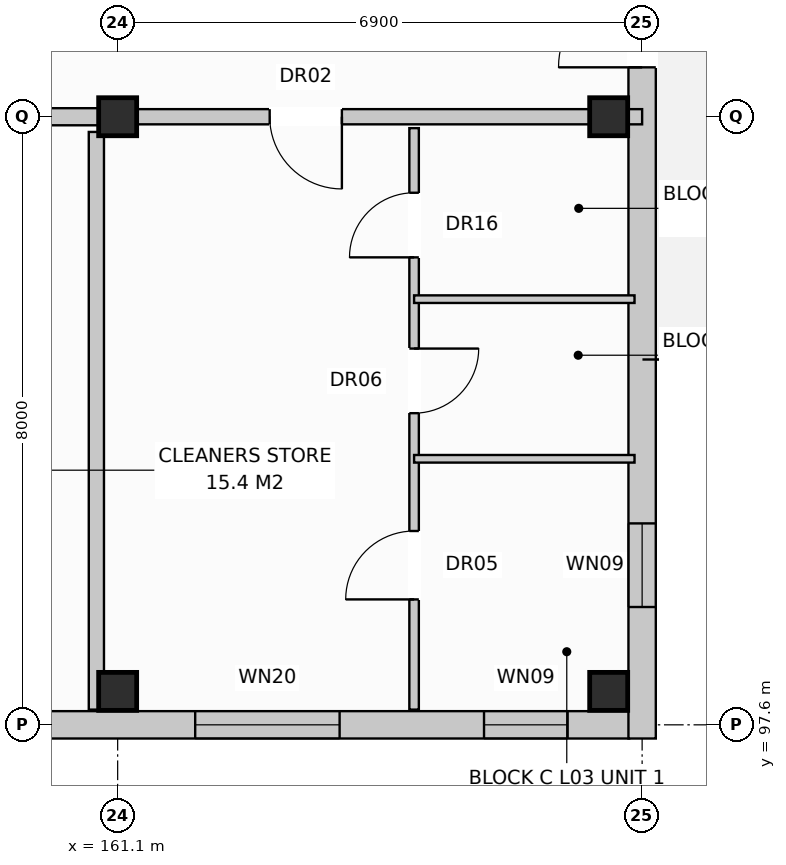
"""IFC4 building model, lengths in metres.
Left out: names, types, materials, properties, quantities, classifications, styles, units other than length and angle.
Written with IfcOpenShell. Run it as: python <this file> out.ifc"""

import sys

from ifc_helpers import new_model, si_unit, direction, frame, frame_2d, origin, origin_with_axes, origin_2d, place, context, subcontext, project, spatial, rectangle, extrude, element, fill, save


model = new_model("IFC4")
c1 = context("Model", 3, precision=1e-05, world=origin(), true_north=direction((0.0, 1.0)))
c2 = subcontext(c1, "Body", "Model", "MODEL_VIEW")
j1 = project(units=[si_unit("LENGTHUNIT", "METRE"), si_unit("PLANEANGLEUNIT", "RADIAN")], contexts=[c1])
p1 = place(None, origin())
s1 = spatial("IfcSite", under=j1, at=p1, CompositionType="ELEMENT")
p2 = place(p1, origin())
s2 = spatial("IfcBuilding", under=s1, at=p2, CompositionType="ELEMENT")
p3 = place(p2, frame((0.0, 0.0, 11.2)))
s3 = spatial("IfcBuildingStorey", under=s2, at=p3, CompositionType="ELEMENT", Elevation=11.2)
for number, where, z_axis, x_axis in (
    (1, (161.1, 98.04, 0.0), (0.0, 0.0, 1.0), (1.0, 0.0, 0.0)),
    (2, (161.1, 105.6, 0.0), (0.0, 0.0, 1.0), (1.0, 0.0, 0.0)),
    (3, (167.56, 98.04, 0.0), (0.0, 0.0, 1.0), (1.0, 0.0, 0.0)),
    (4, (167.56, 105.6, 0.0), (0.0, 0.0, 1.0), (1.0, 0.0, 0.0)),
):
    element("IfcColumn", number, at=place(p3, frame(where, z_axis=z_axis, x_axis=x_axis)), inside=s3, PredefinedType="COLUMN", context=c2, shape_type="SweptSolid", body=[
        extrude(rectangle(XDim=0.5, YDim=0.5, at=origin_2d()), origin(), (0.0, 0.0, 1.0), 3.2),
    ])
p4 = place(p3, frame((151.05, 97.6, 0.0), z_axis=(0.0, 0.0, 1.0), x_axis=(1.0, 0.0, 0.0)))
e5 = element("IfcWall", 5, at=p4, inside=s3, PredefinedType="STANDARD", context=c2, shape_type="SweptSolid", body=[
    extrude(rectangle(XDim=16.78, YDim=0.36, at=frame_2d((8.39, 0.0))), origin(), (0.0, 0.0, 1.0), 2.94),
])
p5 = place(p4, frame((11.07, 0.0, 0.8)))
e6 = element("IfcOpeningElement", 6, at=p5, cuts=e5, PredefinedType="OPENING", context=c2, shape_type="SweptSolid", body=[
    extrude(rectangle(XDim=1.9, YDim=1.85, at=frame_2d((0.95, 0.925))), frame((0.0, 0.192, 0.0), z_axis=(0.0, -1.0, 0.0), x_axis=(1.0, 0.0, 0.0)), (0.0, 0.0, 1.0), 0.384),
])
p6 = place(p4, frame((14.87, 0.0, 0.72)))
e7 = element("IfcOpeningElement", 7, at=p6, cuts=e5, PredefinedType="OPENING", context=c2, shape_type="SweptSolid", body=[
    extrude(rectangle(XDim=1.1, YDim=1.5, at=frame_2d((0.55, 0.75))), frame((0.0, 0.192, 0.0), z_axis=(0.0, -1.0, 0.0), x_axis=(1.0, 0.0, 0.0)), (0.0, 0.0, 1.0), 0.384),
])
p7 = place(p3, frame((168.0, 97.42, 0.0), z_axis=(0.0, 0.0, 1.0), x_axis=(0.0, 1.0, 0.0)))
e8 = element("IfcWall", 8, at=p7, inside=s3, PredefinedType="STANDARD", context=c2, shape_type="SweptSolid", body=[
    extrude(rectangle(XDim=18.76, YDim=0.36, at=frame_2d((9.38, 0.0))), origin(), (0.0, 0.0, 1.0), 2.94),
])
p8 = place(p7, frame((8.83, 0.0, 0.0)))
e9 = element("IfcOpeningElement", 9, at=p8, cuts=e8, PredefinedType="OPENING", context=c2, shape_type="SweptSolid", body=[
    extrude(rectangle(XDim=1.1, YDim=2.1, at=frame_2d((0.55, 1.05))), frame((0.0, 0.192, 0.0), z_axis=(0.0, -1.0, 0.0), x_axis=(1.0, 0.0, 0.0)), (0.0, 0.0, 1.0), 0.384),
])
p9 = place(p7, frame((1.73, 0.0, 0.72)))
e10 = element("IfcOpeningElement", 10, at=p9, cuts=e8, PredefinedType="OPENING", context=c2, shape_type="SweptSolid", body=[
    extrude(rectangle(XDim=1.1, YDim=1.5, at=frame_2d((0.55, 0.75))), frame((0.0, 0.192, 0.0), z_axis=(0.0, -1.0, 0.0), x_axis=(1.0, 0.0, 0.0)), (0.0, 0.0, 1.0), 0.384),
])
p10 = place(p7, frame((15.93, 0.0, 0.72)))
e11 = element("IfcOpeningElement", 11, at=p10, cuts=e8, PredefinedType="OPENING", context=c2, shape_type="SweptSolid", body=[
    extrude(rectangle(XDim=1.1, YDim=1.5, at=frame_2d((0.55, 0.75))), frame((0.0, 0.192, 0.0), z_axis=(0.0, -1.0, 0.0), x_axis=(1.0, 0.0, 0.0)), (0.0, 0.0, 1.0), 0.384),
])
p11 = place(p3, frame((160.82, 97.8, 0.0), z_axis=(0.0, 0.0, 1.0), x_axis=(0.0, 1.0, 0.0)))
e12 = element("IfcWall", 12, at=p11, inside=s3, PredefinedType="PARTITIONING", context=c2, shape_type="SweptSolid", body=[
    extrude(rectangle(XDim=7.6, YDim=0.2, at=frame_2d((3.8, 0.0))), origin(), (0.0, 0.0, 1.0), 2.38),
])
p12 = place(p3, frame((151.2, 105.6, 0.0), z_axis=(0.0, 0.0, 1.0), x_axis=(1.0, 0.0, 0.0)))
e13 = element("IfcWall", 13, at=p12, inside=s3, PredefinedType="PARTITIONING", context=c2, shape_type="SweptSolid", body=[
    extrude(rectangle(XDim=9.9, YDim=0.225, at=frame_2d((4.95, 0.0))), origin(), (0.0, 0.0, 1.0), 2.38),
])
p13 = place(p12, frame((0.475, 0.0, 0.0)))
e14 = element("IfcOpeningElement", 14, at=p13, cuts=e13, PredefinedType="OPENING", context=c2, shape_type="SweptSolid", body=[
    extrude(rectangle(XDim=1.1, YDim=2.15, at=frame_2d((0.55, 1.075))), frame((0.0, 0.125, 0.0), z_axis=(0.0, -1.0, 0.0), x_axis=(1.0, 0.0, 0.0)), (0.0, 0.0, 1.0), 0.249),
])
p14 = place(p12, frame((5.75, 0.0, 0.0)))
e15 = element("IfcOpeningElement", 15, at=p14, cuts=e13, PredefinedType="OPENING", context=c2, shape_type="SweptSolid", body=[
    extrude(rectangle(XDim=0.9, YDim=2.1, at=frame_2d((0.45, 1.05))), frame((0.0, 0.125, 0.0), z_axis=(0.0, -1.0, 0.0), x_axis=(1.0, 0.0, 0.0)), (0.0, 0.0, 1.0), 0.249),
])
p15 = place(p12, frame((7.8, 0.0, 0.0)))
e16 = element("IfcOpeningElement", 16, at=p15, cuts=e13, PredefinedType="OPENING", context=c2, shape_type="SweptSolid", body=[
    extrude(rectangle(XDim=0.95, YDim=2.15, at=frame_2d((0.475, 1.075))), frame((0.0, 0.125, 0.0), z_axis=(0.0, -1.0, 0.0), x_axis=(1.0, 0.0, 0.0)), (0.0, 0.0, 1.0), 0.249),
])
p16 = place(p3, frame((161.1, 105.6, 0.0), z_axis=(0.0, 0.0, 1.0), x_axis=(1.0, 0.0, 0.0)))
e17 = element("IfcWall", 17, at=p16, inside=s3, PredefinedType="PARTITIONING", context=c2, shape_type="SweptSolid", body=[
    extrude(rectangle(XDim=6.9, YDim=0.2, at=frame_2d((3.45, 0.0))), origin(), (0.0, 0.0, 1.0), 2.38),
])
p17 = place(p16, frame((2.0, 0.0, 0.0)))
e18 = element("IfcOpeningElement", 18, at=p17, cuts=e17, PredefinedType="OPENING", context=c2, shape_type="SweptSolid", body=[
    extrude(rectangle(XDim=0.95, YDim=2.15, at=frame_2d((0.475, 1.075))), frame((0.0, 0.112, 0.0), z_axis=(0.0, -1.0, 0.0), x_axis=(1.0, 0.0, 0.0)), (0.0, 0.0, 1.0), 0.224),
])
p18 = place(p3, frame((165.0, 105.45, 0.0), z_axis=(0.0, 0.0, 1.0), x_axis=(0.0, -1.0, 0.0)))
e19 = element("IfcWall", 19, at=p18, inside=s3, PredefinedType="PARTITIONING", context=c2, shape_type="SweptSolid", body=[
    extrude(rectangle(XDim=7.65, YDim=0.125, at=frame_2d((3.825, 0.0))), origin(), (0.0, 0.0, 1.0), 2.94),
])
p19 = place(p18, frame((0.85, 0.0, 0.0)))
e20 = element("IfcOpeningElement", 20, at=p19, cuts=e19, PredefinedType="OPENING", context=c2, shape_type="SweptSolid", body=[
    extrude(rectangle(XDim=0.85, YDim=2.1, at=frame_2d((0.425, 1.05))), frame((0.0, 0.074, 0.0), z_axis=(0.0, -1.0, 0.0), x_axis=(1.0, 0.0, 0.0)), (0.0, 0.0, 1.0), 0.149),
])
p20 = place(p18, frame((2.9, 0.0, 0.0)))
e21 = element("IfcOpeningElement", 21, at=p20, cuts=e19, PredefinedType="OPENING", context=c2, shape_type="SweptSolid", body=[
    extrude(rectangle(XDim=0.85, YDim=2.05, at=frame_2d((0.425, 1.025))), frame((0.0, 0.074, 0.0), z_axis=(0.0, -1.0, 0.0), x_axis=(1.0, 0.0, 0.0)), (0.0, 0.0, 1.0), 0.149),
])
p21 = place(p18, frame((5.3, 0.0, 0.0)))
e22 = element("IfcOpeningElement", 22, at=p21, cuts=e19, PredefinedType="OPENING", context=c2, shape_type="SweptSolid", body=[
    extrude(rectangle(XDim=0.9, YDim=2.1, at=frame_2d((0.45, 1.05))), frame((0.0, 0.074, 0.0), z_axis=(0.0, -1.0, 0.0), x_axis=(1.0, 0.0, 0.0)), (0.0, 0.0, 1.0), 0.149),
])
for number, where, z_axis, x_axis in (
    (23, (165.0, 103.2, 0.0), (0.0, 0.0, 1.0), (1.0, 0.0, 0.0)),
    (24, (165.0, 101.1, 0.0), (0.0, 0.0, 1.0), (1.0, 0.0, 0.0)),
):
    element("IfcWall", number, at=place(p3, frame(where, z_axis=z_axis, x_axis=x_axis)), inside=s3, PredefinedType="PARTITIONING", context=c2, shape_type="SweptSolid", body=[
        extrude(rectangle(XDim=2.9, YDim=0.1, at=frame_2d((1.45, 0.0))), origin(), (0.0, 0.0, 1.0), 2.94),
    ])
p22 = place(p5, origin_with_axes())
e25 = element("IfcWindow", 25, at=p22, inside=s3, PartitioningType="SINGLE_PANEL", PredefinedType="WINDOW", context=c2, shape_type="SweptSolid", body=[
    extrude(rectangle(XDim=1.9, YDim=1.85, at=frame_2d((0.95, 0.925))), frame((0.0, 0.03, 0.0), z_axis=(0.0, -1.0, 0.0), x_axis=(1.0, 0.0, 0.0)), (0.0, 0.0, 1.0), 0.06),
])
fill(e6, e25)
p23 = place(p6, origin_with_axes())
e26 = element("IfcWindow", 26, at=p23, inside=s3, PartitioningType="SINGLE_PANEL", PredefinedType="WINDOW", context=c2, shape_type="SweptSolid", body=[
    extrude(rectangle(XDim=1.1, YDim=1.5, at=frame_2d((0.55, 0.75))), frame((0.0, 0.03, 0.0), z_axis=(0.0, -1.0, 0.0), x_axis=(1.0, 0.0, 0.0)), (0.0, 0.0, 1.0), 0.06),
])
fill(e7, e26)
p24 = place(p8, origin_with_axes())
e27 = element("IfcDoor", 27, at=p24, inside=s3, OperationType="SINGLE_SWING_LEFT", PredefinedType="DOOR", context=c2, shape_type="SweptSolid", body=[
    extrude(rectangle(XDim=1.1, YDim=2.1, at=frame_2d((0.55, 1.05))), frame((0.0, 0.025, 0.0), z_axis=(0.0, -1.0, 0.0), x_axis=(1.0, 0.0, 0.0)), (0.0, 0.0, 1.0), 0.05),
])
fill(e9, e27)
p25 = place(p9, origin_with_axes())
e28 = element("IfcWindow", 28, at=p25, inside=s3, PartitioningType="SINGLE_PANEL", PredefinedType="WINDOW", context=c2, shape_type="SweptSolid", body=[
    extrude(rectangle(XDim=1.1, YDim=1.5, at=frame_2d((0.55, 0.75))), frame((0.0, 0.03, 0.0), z_axis=(0.0, -1.0, 0.0), x_axis=(1.0, 0.0, 0.0)), (0.0, 0.0, 1.0), 0.06),
])
fill(e10, e28)
p26 = place(p17, frame((0.95, 0.0, 0.0), z_axis=(0.0, 0.0, 1.0), x_axis=(-1.0, 0.0, 0.0)))
e29 = element("IfcDoor", 29, at=p26, inside=s3, OperationType="SINGLE_SWING_RIGHT", PredefinedType="DOOR", context=c2, shape_type="SweptSolid", body=[
    extrude(rectangle(XDim=0.95, YDim=2.15, at=frame_2d((0.475, 1.075))), frame((0.0, 0.025, 0.0), z_axis=(0.0, -1.0, 0.0), x_axis=(1.0, 0.0, 0.0)), (0.0, 0.0, 1.0), 0.05),
])
fill(e18, e29)
p27 = place(p19, frame((0.85, 0.0, 0.0), z_axis=(0.0, 0.0, 1.0), x_axis=(-1.0, 0.0, 0.0)))
e30 = element("IfcDoor", 30, at=p27, inside=s3, OperationType="SINGLE_SWING_RIGHT", PredefinedType="DOOR", context=c2, shape_type="SweptSolid", body=[
    extrude(rectangle(XDim=0.85, YDim=2.1, at=frame_2d((0.425, 1.05))), frame((0.0, 0.025, 0.0), z_axis=(0.0, -1.0, 0.0), x_axis=(1.0, 0.0, 0.0)), (0.0, 0.0, 1.0), 0.05),
])
fill(e20, e30)
p28 = place(p20, origin_with_axes())
e31 = element("IfcDoor", 31, at=p28, inside=s3, OperationType="SINGLE_SWING_LEFT", PredefinedType="DOOR", context=c2, shape_type="SweptSolid", body=[
    extrude(rectangle(XDim=0.85, YDim=2.05, at=frame_2d((0.425, 1.025))), frame((0.0, 0.025, 0.0), z_axis=(0.0, -1.0, 0.0), x_axis=(1.0, 0.0, 0.0)), (0.0, 0.0, 1.0), 0.05),
])
fill(e21, e31)
p29 = place(p21, frame((0.9, 0.0, 0.0), z_axis=(0.0, 0.0, 1.0), x_axis=(-1.0, 0.0, 0.0)))
e32 = element("IfcDoor", 32, at=p29, inside=s3, OperationType="SINGLE_SWING_RIGHT", PredefinedType="DOOR", context=c2, shape_type="SweptSolid", body=[
    extrude(rectangle(XDim=0.9, YDim=2.1, at=frame_2d((0.45, 1.05))), frame((0.0, 0.025, 0.0), z_axis=(0.0, -1.0, 0.0), x_axis=(1.0, 0.0, 0.0)), (0.0, 0.0, 1.0), 0.05),
])
fill(e22, e32)
save(model, sys.argv[1])
